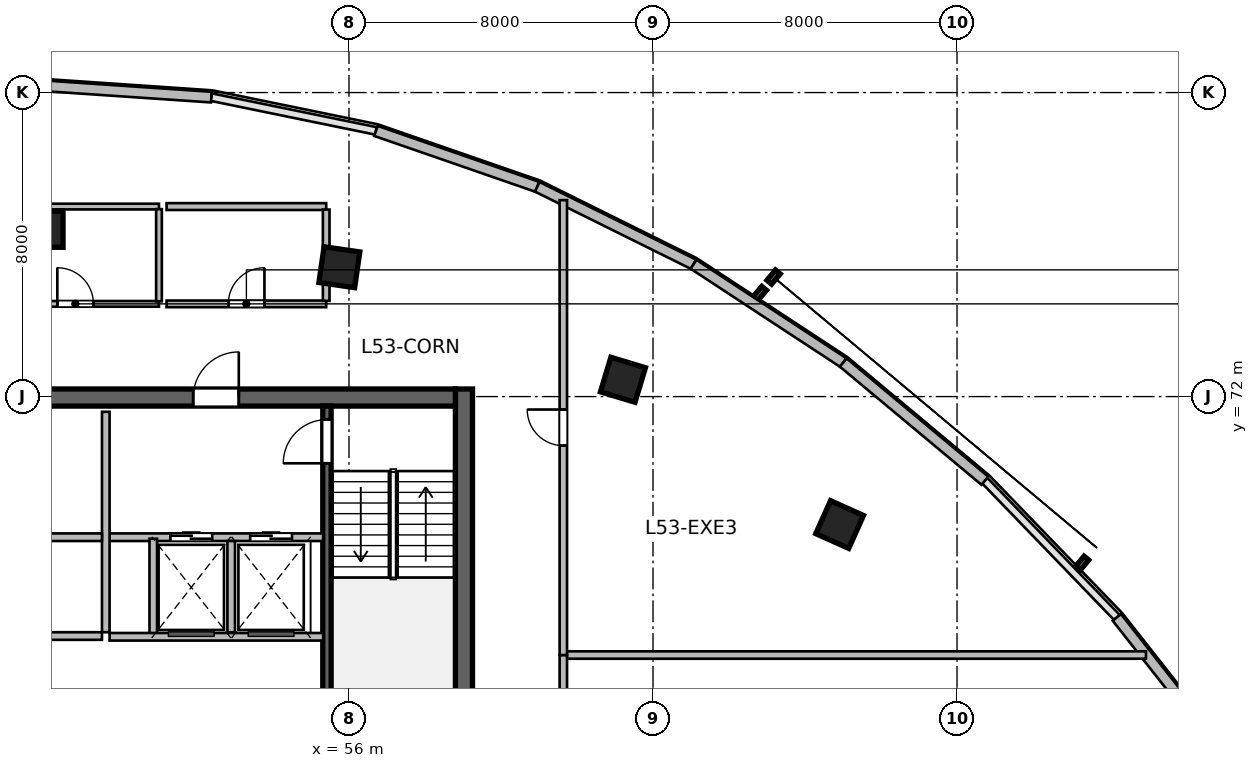
"""IFC4 building model, lengths in metres.
Left out: names, types, materials, properties, quantities, classifications, styles, units other than length and angle.
Written with IfcOpenShell. Run it as: python <this file> out.ifc"""

import sys

from ifc_helpers import new_model, si_unit, direction, frame, frame_2d, origin, origin_2d, place, context, subcontext, project, spatial, rectangle, extrude, source, transform, mapped, element, fill, save


model = new_model("IFC4")
c1 = context("Model", 3, precision=1e-05, world=origin(), true_north=direction((0.0, 1.0)))
c2 = subcontext(c1, "Body", "Model", "MODEL_VIEW")
j1 = project(units=[si_unit("LENGTHUNIT", "METRE"), si_unit("PLANEANGLEUNIT", "RADIAN")], contexts=[c1])
p1 = place(None, origin())
s1 = spatial("IfcSite", under=j1, at=p1, CompositionType="ELEMENT")
p2 = place(p1, origin())
s2 = spatial("IfcBuilding", under=s1, at=p2, CompositionType="ELEMENT")
p3 = place(p2, frame((0.0, 0.0, 219.6)))
s3 = spatial("IfcBuildingStorey", under=s2, at=p3, CompositionType="ELEMENT", Elevation=219.6)
m1 = source(origin(), c2, "Body", "SweptSolid", [
    extrude(rectangle(XDim=12.0, YDim=0.45, at=frame_2d((6.0, 0.0))), origin(), (0.0, 0.0, 1.0), 3.9),
])
p4 = place(p3, frame((59.025, 60.2, 0.0), z_axis=(0.0, 0.0, 1.0), x_axis=(0.0, 1.0, 0.0)))
e1 = element("IfcWall", 1, at=p4, inside=s3, PredefinedType="SHEAR", context=c2, shape_type="MappedRepresentation", body=[
    mapped(m1, transform((0.0, 0.0, 0.0), scale=1.0)),
])
m2 = source(origin(), c2, "Body", "SweptSolid", [
    extrude(rectangle(XDim=21.6, YDim=0.45, at=frame_2d((10.8, 0.0))), origin(), (0.0, 0.0, 1.0), 3.9),
])
p5 = place(p3, frame((37.2, 71.975, 0.0), z_axis=(0.0, 0.0, 1.0), x_axis=(1.0, 0.0, 0.0)))
e2 = element("IfcWall", 2, at=p5, inside=s3, PredefinedType="SHEAR", context=c2, shape_type="MappedRepresentation", body=[
    mapped(m2, transform((0.0, 0.0, 0.0), scale=1.0)),
])
p6 = place(p5, frame((1.2, 0.0, 0.0)))
e3 = element("IfcOpeningElement", 3, at=p6, cuts=e2, PredefinedType="OPENING", context=c2, shape_type="SweptSolid", body=[
    extrude(rectangle(XDim=0.9, YDim=2.1, at=frame_2d((0.45, 1.05))), frame((0.0, 0.235, 0.0), z_axis=(0.0, -1.0, 0.0), x_axis=(1.0, 0.0, 0.0)), (0.0, 0.0, 1.0), 0.47),
])
p7 = place(p5, frame((14.7, 0.0, 0.0)))
e4 = element("IfcOpeningElement", 4, at=p7, cuts=e2, PredefinedType="OPENING", context=c2, shape_type="SweptSolid", body=[
    extrude(rectangle(XDim=1.2, YDim=2.15, at=frame_2d((0.6, 1.075))), frame((0.0, 0.235, 0.0), z_axis=(0.0, -1.0, 0.0), x_axis=(1.0, 0.0, 0.0)), (0.0, 0.0, 1.0), 0.47),
])
p8 = place(p5, frame((4.15, 0.0, 0.0)))
e5 = element("IfcOpeningElement", 5, at=p8, cuts=e2, PredefinedType="OPENING", context=c2, shape_type="SweptSolid", body=[
    extrude(rectangle(XDim=1.3, YDim=2.15, at=frame_2d((0.65, 1.075))), frame((0.0, 0.235, 0.0), z_axis=(0.0, -1.0, 0.0), x_axis=(1.0, 0.0, 0.0)), (0.0, 0.0, 1.0), 0.47),
])
p9 = place(p5, frame((7.25, 0.0, 0.0)))
e6 = element("IfcOpeningElement", 6, at=p9, cuts=e2, PredefinedType="OPENING", context=c2, shape_type="SweptSolid", body=[
    extrude(rectangle(XDim=0.9, YDim=2.1, at=frame_2d((0.45, 1.05))), frame((0.0, 0.235, 0.0), z_axis=(0.0, -1.0, 0.0), x_axis=(1.0, 0.0, 0.0)), (0.0, 0.0, 1.0), 0.47),
])
m3 = source(origin(), c2, "Body", "SweptSolid", [
    extrude(rectangle(XDim=11.1, YDim=0.22, at=frame_2d((5.55, 0.0))), origin(), (0.0, 0.0, 1.0), 3.9),
])
p10 = place(p3, frame((55.42, 60.65, 0.0), z_axis=(0.0, 0.0, 1.0), x_axis=(0.0, 1.0, 0.0)))
e7 = element("IfcWall", 7, at=p10, inside=s3, PredefinedType="SHEAR", context=c2, shape_type="MappedRepresentation", body=[
    mapped(m3, transform((0.0, 0.0, 0.0), scale=1.0)),
])
p11 = place(p10, frame((9.595, 0.0, 0.0)))
e8 = element("IfcOpeningElement", 8, at=p11, cuts=e7, PredefinedType="OPENING", context=c2, shape_type="SweptSolid", body=[
    extrude(rectangle(XDim=1.15, YDim=2.15, at=frame_2d((0.575, 1.075))), frame((0.0, 0.12, 0.0), z_axis=(0.0, -1.0, 0.0), x_axis=(1.0, 0.0, 0.0)), (0.0, 0.0, 1.0), 0.24),
])
m4 = source(origin(), c2, "Body", "SweptSolid", [
    extrude(rectangle(XDim=0.95, YDim=0.95, at=origin_2d()), origin(), (0.0, 0.0, 1.0), 3.9),
])
for number, where, z_axis, x_axis in (
    (9, (48.0, 76.404, 0.0), (0.0, 0.0, 1.0), (0.0, 1.0, 0.0)),
    (10, (55.747, 75.404, 0.0), (0.0, 0.0, 1.0), (0.143, 0.99, 0.0)),
    (11, (63.209, 72.442, 0.0), (0.0, 0.0, 1.0), (0.289, 0.957, 0.0)),
    (12, (68.91, 68.633, 0.0), (0.0, 0.0, 1.0), (0.409, 0.912, 0.0)),
):
    element("IfcColumn", number, at=place(p3, frame(where, z_axis=z_axis, x_axis=x_axis)), inside=s3, PredefinedType="COLUMN", context=c2, shape_type="MappedRepresentation", body=[
        mapped(m4, transform((0.0, 0.0, 0.0), scale=1.0)),
    ])
m5 = source(origin(), c2, "Body", "SweptSolid", [
    extrude(rectangle(XDim=4.387, YDim=0.28, at=frame_2d((2.193, 0.0))), origin(), (0.0, 0.0, 1.0), 3.64),
])
p12 = place(p3, frame((48.0, 80.177, 0.0), z_axis=(0.0, 0.0, 1.0), x_axis=(0.997703650546, -0.06773053733, 0.0)))
e13 = element("IfcWall", 13, at=p12, inside=s3, PredefinedType="SOLIDWALL", context=c2, shape_type="MappedRepresentation", body=[
    mapped(m5, transform((0.0, 0.0, 0.0), scale=1.0)),
])
m6 = source(origin(), c2, "Body", "SweptSolid", [
    extrude(rectangle(XDim=4.492, YDim=0.28, at=frame_2d((2.246, 0.0))), origin(), (0.0, 0.0, 1.0), 3.64),
])
p13 = place(p3, frame((56.709, 78.991, 0.0), z_axis=(0.0, 0.0, 1.0), x_axis=(0.944872297412, -0.32743906545, 0.0)))
e14 = element("IfcWall", 14, at=p13, inside=s3, PredefinedType="SOLIDWALL", context=c2, shape_type="MappedRepresentation", body=[
    mapped(m6, transform((0.0, 0.0, 0.0), scale=1.0)),
])
m7 = source(origin(), c2, "Body", "SweptSolid", [
    extrude(rectangle(XDim=4.59, YDim=0.28, at=frame_2d((2.295, 0.0))), origin(), (0.0, 0.0, 1.0), 3.64),
])
p14 = place(p3, frame((60.954, 77.52, 0.0), z_axis=(0.0, 0.0, 1.0), x_axis=(0.895974834987, -0.444104824418, 0.0)))
e15 = element("IfcWall", 15, at=p14, inside=s3, PredefinedType="SOLIDWALL", context=c2, shape_type="MappedRepresentation", body=[
    mapped(m7, transform((0.0, 0.0, 0.0), scale=1.0)),
])
m8 = source(origin(), c2, "Body", "SweptSolid", [
    extrude(rectangle(XDim=4.713, YDim=0.28, at=frame_2d((2.356, 0.0))), origin(), (0.0, 0.0, 1.0), 3.64),
])
p15 = place(p3, frame((65.066, 75.482, 0.0), z_axis=(0.0, 0.0, 1.0), x_axis=(0.835974386457, -0.548768462275, 0.0)))
e16 = element("IfcWall", 16, at=p15, inside=s3, PredefinedType="SOLIDWALL", context=c2, shape_type="MappedRepresentation", body=[
    mapped(m8, transform((0.0, 0.0, 0.0), scale=1.0)),
])
m9 = source(origin(), c2, "Body", "SweptSolid", [
    extrude(rectangle(XDim=4.852, YDim=0.28, at=frame_2d((2.426, 0.0))), origin(), (0.0, 0.0, 1.0), 3.64),
])
p16 = place(p3, frame((69.006, 72.896, 0.0), z_axis=(0.0, 0.0, 1.0), x_axis=(0.767936605821, -0.640525853843, 0.0)))
e17 = element("IfcWall", 17, at=p16, inside=s3, PredefinedType="SOLIDWALL", context=c2, shape_type="MappedRepresentation", body=[
    mapped(m9, transform((0.0, 0.0, 0.0), scale=1.0)),
])
m10 = source(origin(), c2, "Body", "SweptSolid", [
    extrude(rectangle(XDim=5.153, YDim=0.28, at=frame_2d((2.577, 0.0))), origin(), (0.0, 0.0, 1.0), 3.64),
])
p17 = place(p3, frame((76.205, 66.19, 0.0), z_axis=(0.0, 0.0, 1.0), x_axis=(0.618179283891, -0.786037132054, 0.0)))
e18 = element("IfcWall", 18, at=p17, inside=s3, PredefinedType="SOLIDWALL", context=c2, shape_type="MappedRepresentation", body=[
    mapped(m10, transform((0.0, 0.0, 0.0), scale=1.0)),
])
m11 = source(origin(), c2, "Body", "SweptSolid", [
    extrude(rectangle(XDim=5.62, YDim=0.2, at=frame_2d((2.81, 0.0))), origin(), (0.0, 0.0, 1.0), 3.64),
])
p18 = place(p3, frame((49.7, 68.3, 0.0), z_axis=(0.0, 0.0, 1.0), x_axis=(1.0, 0.0, 0.0)))
e19 = element("IfcWall", 19, at=p18, inside=s3, PredefinedType="SOLIDWALL", context=c2, shape_type="MappedRepresentation", body=[
    mapped(m11, transform((0.0, 0.0, 0.0), scale=1.0)),
])
p19 = place(p18, frame((1.6, 0.0, 0.0)))
e20 = element("IfcOpeningElement", 20, at=p19, cuts=e19, PredefinedType="OPENING", context=c2, shape_type="SweptSolid", body=[
    extrude(rectangle(XDim=1.1, YDim=2.15, at=frame_2d((0.55, 1.075))), frame((0.0, 0.11, 0.0), z_axis=(0.0, -1.0, 0.0), x_axis=(1.0, 0.0, 0.0)), (0.0, 0.0, 1.0), 0.22),
])
p20 = place(p18, frame((3.7, 0.0, 0.0)))
e21 = element("IfcOpeningElement", 21, at=p20, cuts=e19, PredefinedType="OPENING", context=c2, shape_type="SweptSolid", body=[
    extrude(rectangle(XDim=1.1, YDim=2.15, at=frame_2d((0.55, 1.075))), frame((0.0, 0.11, 0.0), z_axis=(0.0, -1.0, 0.0), x_axis=(1.0, 0.0, 0.0)), (0.0, 0.0, 1.0), 0.22),
])
m12 = source(origin(), c2, "Body", "SweptSolid", [
    extrude(rectangle(XDim=5.8, YDim=0.2, at=frame_2d((2.9, 0.0))), origin(), (0.0, 0.0, 1.0), 3.64),
])
p21 = place(p3, frame((49.6, 65.8, 0.0), z_axis=(0.0, 0.0, 1.0), x_axis=(0.0, 1.0, 0.0)))
e22 = element("IfcWall", 22, at=p21, inside=s3, PredefinedType="SOLIDWALL", context=c2, shape_type="MappedRepresentation", body=[
    mapped(m12, transform((0.0, 0.0, 0.0), scale=1.0)),
])
m13 = source(origin(), c2, "Body", "SweptSolid", [
    extrude(rectangle(XDim=2.58, YDim=0.2, at=frame_2d((1.29, 0.0))), origin(), (0.0, 0.0, 1.0), 3.64),
])
p22 = place(p3, frame((50.85, 65.68, 0.0), z_axis=(0.0, 0.0, 1.0), x_axis=(0.0, 1.0, 0.0)))
e23 = element("IfcWall", 23, at=p22, inside=s3, PredefinedType="SOLIDWALL", context=c2, shape_type="MappedRepresentation", body=[
    mapped(m13, transform((0.0, 0.0, 0.0), scale=1.0)),
])
m14 = source(origin(), c2, "Body", "SweptSolid", [
    extrude(rectangle(XDim=2.4, YDim=0.2, at=frame_2d((1.2, 0.0))), origin(), (0.0, 0.0, 1.0), 3.64),
])
p23 = place(p3, frame((52.9, 65.8, 0.0), z_axis=(0.0, 0.0, 1.0), x_axis=(0.0, 1.0, 0.0)))
e24 = element("IfcWall", 24, at=p23, inside=s3, PredefinedType="SOLIDWALL", context=c2, shape_type="MappedRepresentation", body=[
    mapped(m14, transform((0.0, 0.0, 0.0), scale=1.0)),
])
p24 = place(p3, frame((49.7, 65.68, 0.0), z_axis=(0.0, 0.0, 1.0), x_axis=(1.0, 0.0, 0.0)))
e25 = element("IfcWall", 25, at=p24, inside=s3, PredefinedType="SOLIDWALL", context=c2, shape_type="MappedRepresentation", body=[
    mapped(m11, transform((0.0, 0.0, 0.0), scale=1.0)),
])
m15 = source(origin(), c2, "Body", "SweptSolid", [
    extrude(rectangle(XDim=8.8, YDim=0.2, at=frame_2d((4.4, 0.0))), origin(), (0.0, 0.0, 1.0), 3.64),
])
p25 = place(p3, frame((40.7, 68.3, 0.0), z_axis=(0.0, 0.0, 1.0), x_axis=(1.0, 0.0, 0.0)))
e26 = element("IfcWall", 26, at=p25, inside=s3, PredefinedType="SOLIDWALL", context=c2, shape_type="MappedRepresentation", body=[
    mapped(m15, transform((0.0, 0.0, 0.0), scale=1.0)),
])
p26 = place(p3, frame((40.7, 65.7, 0.0), z_axis=(0.0, 0.0, 1.0), x_axis=(1.0, 0.0, 0.0)))
e27 = element("IfcWall", 27, at=p26, inside=s3, PredefinedType="SOLIDWALL", context=c2, shape_type="MappedRepresentation", body=[
    mapped(m15, transform((0.0, 0.0, 0.0), scale=1.0)),
])
p27 = place(p26, frame((1.6, 0.0, 0.0)))
e28 = element("IfcOpeningElement", 28, at=p27, cuts=e27, PredefinedType="OPENING", context=c2, shape_type="SweptSolid", body=[
    extrude(rectangle(XDim=0.9, YDim=2.1, at=frame_2d((0.45, 1.05))), frame((0.0, 0.11, 0.0), z_axis=(0.0, -1.0, 0.0), x_axis=(1.0, 0.0, 0.0)), (0.0, 0.0, 1.0), 0.22),
])
p28 = place(p26, frame((6.1, 0.0, 0.0)))
e29 = element("IfcOpeningElement", 29, at=p28, cuts=e27, PredefinedType="OPENING", context=c2, shape_type="SweptSolid", body=[
    extrude(rectangle(XDim=0.9, YDim=2.1, at=frame_2d((0.45, 1.05))), frame((0.0, 0.11, 0.0), z_axis=(0.0, -1.0, 0.0), x_axis=(1.0, 0.0, 0.0)), (0.0, 0.0, 1.0), 0.22),
])
m16 = source(origin(), c2, "Body", "SweptSolid", [
    extrude(rectangle(XDim=4.4, YDim=0.15, at=frame_2d((2.2, 0.0))), origin(), (0.0, 0.0, 1.0), 3.64),
])
p29 = place(p3, frame((46.6, 74.44, 0.0), z_axis=(0.0, 0.0, 1.0), x_axis=(1.0, 0.0, 0.0)))
e30 = element("IfcWall", 30, at=p29, inside=s3, PredefinedType="PARTITIONING", context=c2, shape_type="MappedRepresentation", body=[
    mapped(m16, transform((0.0, 0.0, 0.0), scale=1.0)),
])
p30 = place(p29, frame((1.725, 0.0, 0.0)))
e31 = element("IfcOpeningElement", 31, at=p30, cuts=e30, PredefinedType="OPENING", context=c2, shape_type="SweptSolid", body=[
    extrude(rectangle(XDim=0.95, YDim=2.1, at=frame_2d((0.475, 1.05))), frame((0.0, 0.085, 0.0), z_axis=(0.0, -1.0, 0.0), x_axis=(1.0, 0.0, 0.0)), (0.0, 0.0, 1.0), 0.17),
])
p31 = place(p3, frame((46.6, 77.0, 0.0), z_axis=(0.0, 0.0, 1.0), x_axis=(1.0, 0.0, 0.0)))
e32 = element("IfcWall", 32, at=p31, inside=s3, PredefinedType="PARTITIONING", context=c2, shape_type="MappedRepresentation", body=[
    mapped(m16, transform((0.0, 0.0, 0.0), scale=1.0)),
])
m17 = source(origin(), c2, "Body", "SweptSolid", [
    extrude(rectangle(XDim=2.425, YDim=0.15, at=frame_2d((1.212, 0.0))), origin(), (0.0, 0.0, 1.0), 3.64),
])
p32 = place(p3, frame((51.0, 74.508, 0.0), z_axis=(0.0, 0.0, 1.0), x_axis=(0.0, 1.0, 0.0)))
e33 = element("IfcWall", 33, at=p32, inside=s3, PredefinedType="PARTITIONING", context=c2, shape_type="MappedRepresentation", body=[
    mapped(m17, transform((0.0, 0.0, 0.0), scale=1.0)),
])
m18 = source(origin(), c2, "Body", "SweptSolid", [
    extrude(rectangle(XDim=4.2, YDim=0.175, at=frame_2d((2.1, 0.0))), origin(), (0.0, 0.0, 1.0), 3.64),
])
p33 = place(p3, frame((51.2, 74.44, 0.0), z_axis=(0.0, 0.0, 1.0), x_axis=(1.0, 0.0, 0.0)))
e34 = element("IfcWall", 34, at=p33, inside=s3, PredefinedType="PARTITIONING", context=c2, shape_type="MappedRepresentation", body=[
    mapped(m18, transform((0.0, 0.0, 0.0), scale=1.0)),
])
p34 = place(p33, frame((1.625, 0.0, 0.0)))
e35 = element("IfcOpeningElement", 35, at=p34, cuts=e34, PredefinedType="OPENING", context=c2, shape_type="SweptSolid", body=[
    extrude(rectangle(XDim=0.95, YDim=2.12, at=frame_2d((0.475, 1.06))), frame((0.0, 0.098, 0.0), z_axis=(0.0, -1.0, 0.0), x_axis=(1.0, 0.0, 0.0)), (0.0, 0.0, 1.0), 0.195),
])
m19 = source(origin(), c2, "Body", "SweptSolid", [
    extrude(rectangle(XDim=4.2, YDim=0.18, at=frame_2d((2.1, 0.0))), origin(), (0.0, 0.0, 1.0), 3.64),
])
p35 = place(p3, frame((51.2, 77.0, 0.0), z_axis=(0.0, 0.0, 1.0), x_axis=(1.0, 0.0, 0.0)))
e36 = element("IfcWall", 36, at=p35, inside=s3, PredefinedType="PLUMBINGWALL", context=c2, shape_type="MappedRepresentation", body=[
    mapped(m19, transform((0.0, 0.0, 0.0), scale=1.0)),
])
m20 = source(origin(), c2, "Body", "SweptSolid", [
    extrude(rectangle(XDim=2.403, YDim=0.175, at=frame_2d((1.201, 0.0))), origin(), (0.0, 0.0, 1.0), 3.64),
])
p36 = place(p3, frame((55.4, 74.519, 0.0), z_axis=(0.0, 0.0, 1.0), x_axis=(0.0, 1.0, 0.0)))
e37 = element("IfcWall", 37, at=p36, inside=s3, PredefinedType="PARTITIONING", context=c2, shape_type="MappedRepresentation", body=[
    mapped(m20, transform((0.0, 0.0, 0.0), scale=1.0)),
])
m21 = source(origin(), c2, "Body", "SweptSolid", [
    extrude(rectangle(XDim=15.332, YDim=0.195, at=frame_2d((7.666, 0.0))), origin(), (0.0, 0.0, 1.0), 3.64),
])
p37 = place(p3, frame((61.64, 65.2, 0.0), z_axis=(0.0, 0.0, 1.0), x_axis=(1.0, 0.0, 0.0)))
e38 = element("IfcWall", 38, at=p37, inside=s3, PredefinedType="PARTITIONING", context=c2, shape_type="MappedRepresentation", body=[
    mapped(m21, transform((0.0, 0.0, 0.0), scale=1.0)),
])
m22 = source(origin(), c2, "Body", "SweptSolid", [
    extrude(rectangle(XDim=4.0, YDim=0.195, at=frame_2d((2.0, 0.0))), origin(), (0.0, 0.0, 1.0), 3.64),
])
p38 = place(p3, frame((61.64, 61.2, 0.0), z_axis=(0.0, 0.0, 1.0), x_axis=(0.0, 1.0, 0.0)))
e39 = element("IfcWall", 39, at=p38, inside=s3, PredefinedType="PARTITIONING", context=c2, shape_type="MappedRepresentation", body=[
    mapped(m22, transform((0.0, 0.0, 0.0), scale=1.0)),
])
p39 = place(p38, frame((1.045, 0.0, 0.0)))
e40 = element("IfcOpeningElement", 40, at=p39, cuts=e39, PredefinedType="OPENING", context=c2, shape_type="SweptSolid", body=[
    extrude(rectangle(XDim=0.95, YDim=2.1, at=frame_2d((0.475, 1.05))), frame((0.0, 0.107, 0.0), z_axis=(0.0, -1.0, 0.0), x_axis=(1.0, 0.0, 0.0)), (0.0, 0.0, 1.0), 0.215),
])
m23 = source(origin(), c2, "Body", "SweptSolid", [
    extrude(rectangle(XDim=11.969, YDim=0.195, at=frame_2d((5.984, 0.0))), origin(), (0.0, 0.0, 1.0), 3.64),
])
p40 = place(p3, frame((61.64, 65.2, 0.0), z_axis=(0.0, 0.0, 1.0), x_axis=(0.0, 1.0, 0.0)))
e41 = element("IfcWall", 41, at=p40, inside=s3, PredefinedType="PARTITIONING", context=c2, shape_type="MappedRepresentation", body=[
    mapped(m23, transform((0.0, 0.0, 0.0), scale=1.0)),
])
p41 = place(p40, frame((5.51, 0.0, 0.0)))
e42 = element("IfcOpeningElement", 42, at=p41, cuts=e41, PredefinedType="OPENING", context=c2, shape_type="SweptSolid", body=[
    extrude(rectangle(XDim=0.95, YDim=2.1, at=frame_2d((0.475, 1.05))), frame((0.0, 0.107, 0.0), z_axis=(0.0, -1.0, 0.0), x_axis=(1.0, 0.0, 0.0)), (0.0, 0.0, 1.0), 0.215),
])
m24 = source(origin(), c2, "Body", "SweptSolid", [
    extrude(rectangle(XDim=1.15, YDim=2.15, at=frame_2d((0.575, 1.075))), frame((0.0, 0.025, 0.0), z_axis=(0.0, -1.0, 0.0), x_axis=(1.0, 0.0, 0.0)), (0.0, 0.0, 1.0), 0.05),
])
p42 = place(p11, origin())
e43 = element("IfcDoor", 43, at=p42, inside=s3, OperationType="SINGLE_SWING_LEFT", PredefinedType="DOOR", context=c2, shape_type="MappedRepresentation", body=[
    mapped(m24, transform((0.0, 0.0, 0.0), scale=1.0)),
])
fill(e8, e43)
m25 = source(origin(), c2, "Body", "SweptSolid", [
    extrude(rectangle(XDim=1.2, YDim=2.15, at=frame_2d((0.6, 1.075))), frame((0.0, 0.025, 0.0), z_axis=(0.0, -1.0, 0.0), x_axis=(1.0, 0.0, 0.0)), (0.0, 0.0, 1.0), 0.05),
])
p43 = place(p7, origin())
e44 = element("IfcDoor", 44, at=p43, inside=s3, OperationType="SINGLE_SWING_RIGHT", PredefinedType="DOOR", context=c2, shape_type="MappedRepresentation", body=[
    mapped(m25, transform((0.0, 0.0, 0.0), scale=1.0)),
])
fill(e4, e44)
m26 = source(origin(), c2, "Body", "SweptSolid", [
    extrude(rectangle(XDim=1.1, YDim=2.15, at=frame_2d((0.55, 1.075))), frame((0.0, 0.025, 0.0), z_axis=(0.0, -1.0, 0.0), x_axis=(1.0, 0.0, 0.0)), (0.0, 0.0, 1.0), 0.05),
])
p44 = place(p19, origin())
e45 = element("IfcDoor", 45, at=p44, inside=s3, OperationType="DOUBLE_DOOR_SLIDING", PredefinedType="DOOR", context=c2, shape_type="MappedRepresentation", body=[
    mapped(m26, transform((0.0, 0.0, 0.0), scale=1.0)),
])
fill(e20, e45)
p45 = place(p20, origin())
e46 = element("IfcDoor", 46, at=p45, inside=s3, OperationType="DOUBLE_DOOR_SLIDING", PredefinedType="DOOR", context=c2, shape_type="MappedRepresentation", body=[
    mapped(m26, transform((0.0, 0.0, 0.0), scale=1.0)),
])
fill(e21, e46)
m27 = source(origin(), c2, "Body", "SweptSolid", [
    extrude(rectangle(XDim=0.95, YDim=2.1, at=frame_2d((0.475, 1.05))), frame((0.0, 0.025, 0.0), z_axis=(0.0, -1.0, 0.0), x_axis=(1.0, 0.0, 0.0)), (0.0, 0.0, 1.0), 0.05),
])
p46 = place(p30, origin())
e47 = element("IfcDoor", 47, at=p46, inside=s3, OperationType="SINGLE_SWING_LEFT", PredefinedType="DOOR", context=c2, shape_type="MappedRepresentation", body=[
    mapped(m27, transform((0.0, 0.0, 0.0), scale=1.0)),
])
fill(e31, e47)
m28 = source(origin(), c2, "Body", "SweptSolid", [
    extrude(rectangle(XDim=0.95, YDim=2.12, at=frame_2d((0.475, 1.06))), frame((0.0, 0.025, 0.0), z_axis=(0.0, -1.0, 0.0), x_axis=(1.0, 0.0, 0.0)), (0.0, 0.0, 1.0), 0.05),
])
p47 = place(p34, origin())
e48 = element("IfcDoor", 48, at=p47, inside=s3, OperationType="SINGLE_SWING_RIGHT", PredefinedType="DOOR", context=c2, shape_type="MappedRepresentation", body=[
    mapped(m28, transform((0.0, 0.0, 0.0), scale=1.0)),
])
fill(e35, e48)
p48 = place(p41, origin())
e49 = element("IfcDoor", 49, at=p48, inside=s3, OperationType="SINGLE_SWING_RIGHT", PredefinedType="DOOR", context=c2, shape_type="MappedRepresentation", body=[
    mapped(m27, transform((0.0, 0.0, 0.0), scale=1.0)),
])
fill(e42, e49)
save(model, sys.argv[1])
